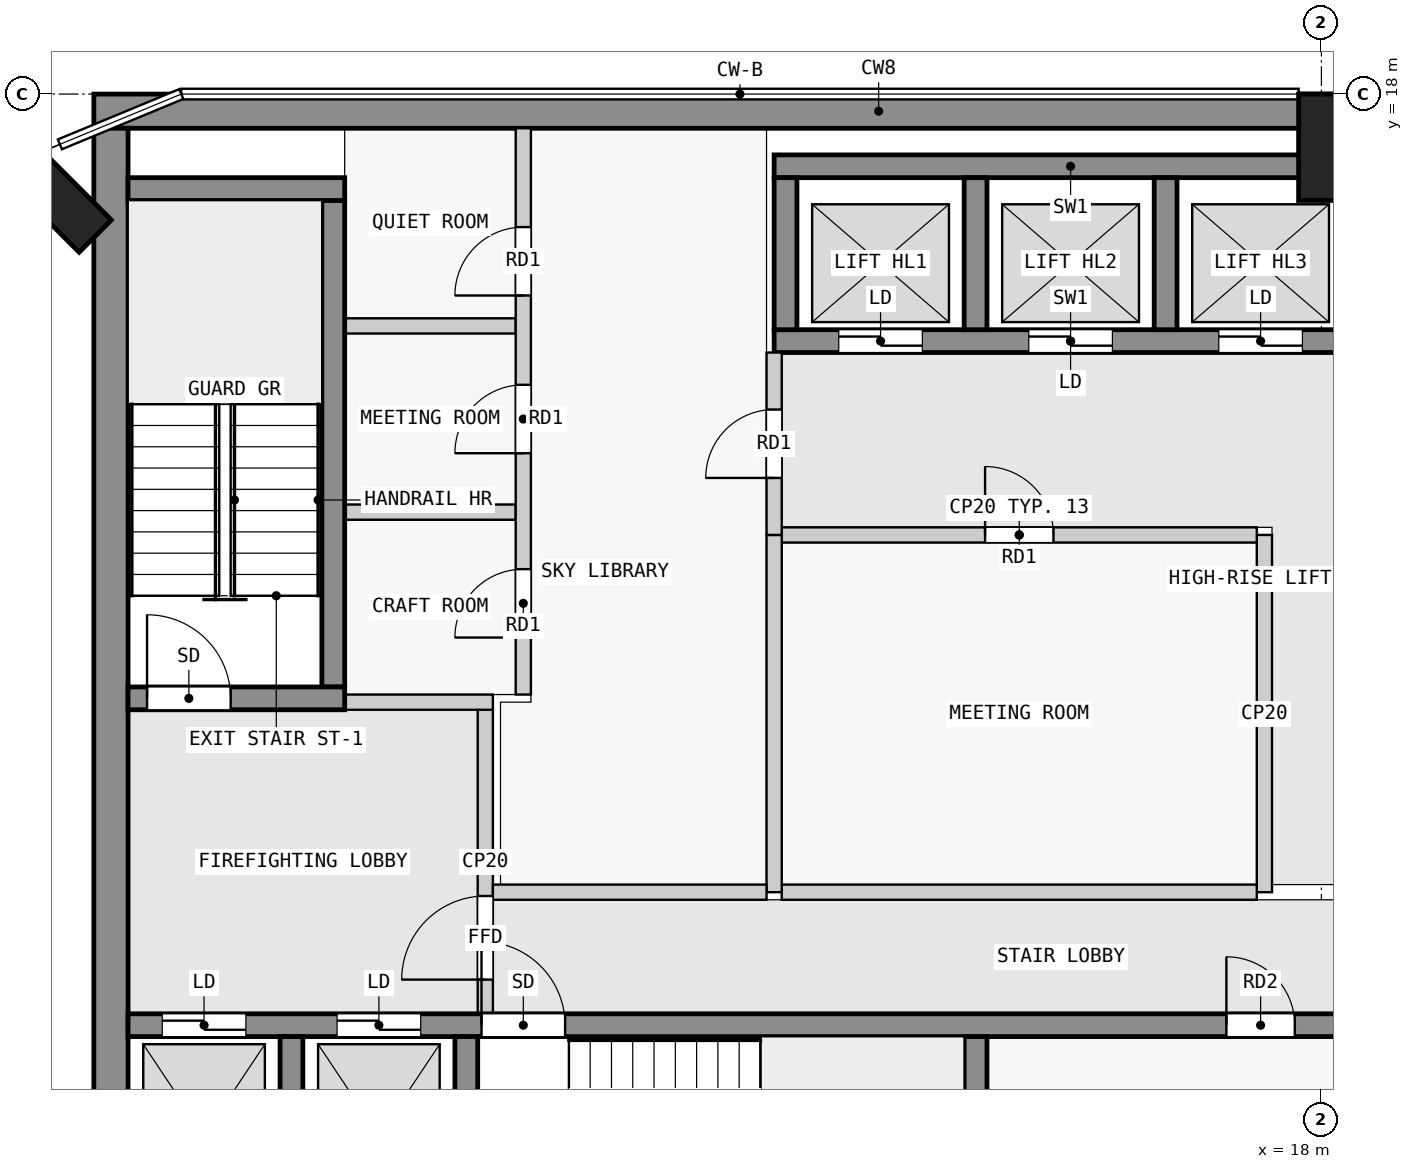
"""IFC4 building model, lengths in metres.
Left out: names, types, materials, properties, quantities, classifications, styles, units other than length and angle.
Written with IfcOpenShell. Run it as: python <this file> out.ifc"""

import sys

from ifc_helpers import new_model, si_unit, direction, frame, frame_2d, origin, origin_2d, place, context, subcontext, project, spatial, rectangle, extrude, element, fill, save


model = new_model("IFC4")
c1 = context("Model", 3, precision=1e-05, world=origin(), true_north=direction((0.0, 1.0)))
c2 = subcontext(c1, "Body", "Model", "MODEL_VIEW")
j1 = project(units=[si_unit("LENGTHUNIT", "METRE"), si_unit("PLANEANGLEUNIT", "RADIAN")], contexts=[c1])
p1 = place(None, origin())
s1 = spatial("IfcSite", under=j1, at=p1, CompositionType="ELEMENT")
p2 = place(p1, origin())
s2 = spatial("IfcBuilding", under=s1, at=p2, CompositionType="ELEMENT")
p3 = place(p2, frame((0.0, 0.0, 280.9)))
s3 = spatial("IfcBuildingStorey", under=s2, at=p3, CompositionType="ELEMENT", Elevation=280.9)
for number, where, z_axis, x_axis in (
    (1, (18.0, 17.3, 0.0), (0.0, 0.0, 1.0), (1.0, 0.0, 0.0)),
    (2, (1.374, 16.626, 0.0), (0.0, 0.0, 1.0), (0.707, 0.707, 0.0)),
):
    element("IfcColumn", number, at=place(p3, frame(where, z_axis=z_axis, x_axis=x_axis)), inside=s3, PredefinedType="COLUMN", context=c2, shape_type="SweptSolid", body=[
        extrude(rectangle(XDim=0.6, YDim=1.4, at=origin_2d()), origin(), (0.0, 0.0, 1.0), 3.5),
    ])
p4 = place(p3, frame((1.85, 17.775, 0.0), z_axis=(0.0, 0.0, 1.0), x_axis=(1.0, 0.0, 0.0)))
e3 = element("IfcWall", 3, at=p4, inside=s3, PredefinedType="SHEAR", context=c2, shape_type="SweptSolid", body=[
    extrude(rectangle(XDim=20.65, YDim=0.45, at=frame_2d((10.325, 0.0))), origin(), (0.0, 0.0, 1.0), 3.25),
])
p5 = place(p3, frame((2.075, 2.5, 0.0), z_axis=(0.0, 0.0, 1.0), x_axis=(0.0, 1.0, 0.0)))
e4 = element("IfcWall", 4, at=p5, inside=s3, PredefinedType="SHEAR", context=c2, shape_type="SweptSolid", body=[
    extrude(rectangle(XDim=15.05, YDim=0.45, at=frame_2d((7.525, 0.0))), origin(), (0.0, 0.0, 1.0), 3.25),
])
for number, where, z_axis, x_axis in (
    (5, (4.45, 2.8, 0.0), (0.0, 0.0, 1.0), (0.0, 1.0, 0.0)),
    (6, (6.75, 2.8, 0.0), (0.0, 0.0, 1.0), (0.0, 1.0, 0.0)),
    (7, (13.45, 2.8, 0.0), (0.0, 0.0, 1.0), (0.0, 1.0, 0.0)),
):
    element("IfcWall", number, at=place(p3, frame(where, z_axis=z_axis, x_axis=x_axis)), inside=s3, PredefinedType="SHEAR", context=c2, shape_type="SweptSolid", body=[
        extrude(rectangle(XDim=2.8, YDim=0.3, at=frame_2d((1.4, 0.0))), origin(), (0.0, 0.0, 1.0), 3.25),
    ])
p6 = place(p3, frame((2.3, 5.75, 0.0), z_axis=(0.0, 0.0, 1.0), x_axis=(1.0, 0.0, 0.0)))
e8 = element("IfcWall", 8, at=p6, inside=s3, PredefinedType="SHEAR", context=c2, shape_type="SweptSolid", body=[
    extrude(rectangle(XDim=18.8, YDim=0.3, at=frame_2d((9.4, 0.0))), origin(), (0.0, 0.0, 1.0), 3.25),
])
p7 = place(p6, frame((4.65, 0.0, 0.0)))
e9 = element("IfcOpeningElement", 9, at=p7, cuts=e8, PredefinedType="OPENING", context=c2, shape_type="SweptSolid", body=[
    extrude(rectangle(XDim=1.1, YDim=2.1, at=frame_2d((0.55, 1.05))), frame((0.0, 0.16, 0.0), z_axis=(0.0, -1.0, 0.0), x_axis=(1.0, 0.0, 0.0)), (0.0, 0.0, 1.0), 0.32),
])
p8 = place(p6, frame((0.45, 0.0, 0.0)))
e10 = element("IfcOpeningElement", 10, at=p8, cuts=e8, PredefinedType="OPENING", context=c2, shape_type="SweptSolid", body=[
    extrude(rectangle(XDim=1.1, YDim=2.1, at=frame_2d((0.55, 1.05))), frame((0.0, 0.16, 0.0), z_axis=(0.0, -1.0, 0.0), x_axis=(1.0, 0.0, 0.0)), (0.0, 0.0, 1.0), 0.32),
])
p9 = place(p6, frame((2.75, 0.0, 0.0)))
e11 = element("IfcOpeningElement", 11, at=p9, cuts=e8, PredefinedType="OPENING", context=c2, shape_type="SweptSolid", body=[
    extrude(rectangle(XDim=1.1, YDim=2.1, at=frame_2d((0.55, 1.05))), frame((0.0, 0.16, 0.0), z_axis=(0.0, -1.0, 0.0), x_axis=(1.0, 0.0, 0.0)), (0.0, 0.0, 1.0), 0.32),
])
p10 = place(p6, frame((14.45, 0.0, 0.0)))
e12 = element("IfcOpeningElement", 12, at=p10, cuts=e8, PredefinedType="OPENING", context=c2, shape_type="SweptSolid", body=[
    extrude(rectangle(XDim=0.9, YDim=2.1, at=frame_2d((0.45, 1.05))), frame((0.0, 0.16, 0.0), z_axis=(0.0, -1.0, 0.0), x_axis=(1.0, 0.0, 0.0)), (0.0, 0.0, 1.0), 0.32),
])
p11 = place(p3, frame((2.3, 10.05, 0.0), z_axis=(0.0, 0.0, 1.0), x_axis=(1.0, 0.0, 0.0)))
e13 = element("IfcWall", 13, at=p11, inside=s3, PredefinedType="SHEAR", context=c2, shape_type="SweptSolid", body=[
    extrude(rectangle(XDim=2.85, YDim=0.3, at=frame_2d((1.425, 0.0))), origin(), (0.0, 0.0, 1.0), 3.25),
])
p12 = place(p11, frame((0.25, 0.0, 0.0)))
e14 = element("IfcOpeningElement", 14, at=p12, cuts=e13, PredefinedType="OPENING", context=c2, shape_type="SweptSolid", body=[
    extrude(rectangle(XDim=1.1, YDim=2.1, at=frame_2d((0.55, 1.05))), frame((0.0, 0.16, 0.0), z_axis=(0.0, -1.0, 0.0), x_axis=(1.0, 0.0, 0.0)), (0.0, 0.0, 1.0), 0.32),
])
p13 = place(p3, frame((5.0, 10.2, 0.0), z_axis=(0.0, 0.0, 1.0), x_axis=(0.0, 1.0, 0.0)))
e15 = element("IfcWall", 15, at=p13, inside=s3, PredefinedType="SHEAR", context=c2, shape_type="SweptSolid", body=[
    extrude(rectangle(XDim=6.4, YDim=0.3, at=frame_2d((3.2, 0.0))), origin(), (0.0, 0.0, 1.0), 3.25),
])
p14 = place(p3, frame((2.3, 16.75, 0.0), z_axis=(0.0, 0.0, 1.0), x_axis=(1.0, 0.0, 0.0)))
e16 = element("IfcWall", 16, at=p14, inside=s3, PredefinedType="SHEAR", context=c2, shape_type="SweptSolid", body=[
    extrude(rectangle(XDim=2.85, YDim=0.3, at=frame_2d((1.425, 0.0))), origin(), (0.0, 0.0, 1.0), 3.25),
])
p15 = place(p3, frame((10.8, 17.05, 0.0), z_axis=(0.0, 0.0, 1.0), x_axis=(1.0, 0.0, 0.0)))
e17 = element("IfcWall", 17, at=p15, inside=s3, PredefinedType="SHEAR", context=c2, shape_type="SweptSolid", body=[
    extrude(rectangle(XDim=7.8, YDim=0.3, at=frame_2d((3.9, 0.0))), origin(), (0.0, 0.0, 1.0), 3.25),
])
p16 = place(p3, frame((10.8, 14.75, 0.0), z_axis=(0.0, 0.0, 1.0), x_axis=(1.0, 0.0, 0.0)))
e18 = element("IfcWall", 18, at=p16, inside=s3, PredefinedType="SHEAR", context=c2, shape_type="SweptSolid", body=[
    extrude(rectangle(XDim=7.8, YDim=0.3, at=frame_2d((3.9, 0.0))), origin(), (0.0, 0.0, 1.0), 3.25),
])
p17 = place(p16, frame((0.85, 0.0, 0.0)))
e19 = element("IfcOpeningElement", 19, at=p17, cuts=e18, PredefinedType="OPENING", context=c2, shape_type="SweptSolid", body=[
    extrude(rectangle(XDim=1.1, YDim=2.1, at=frame_2d((0.55, 1.05))), frame((0.0, 0.16, 0.0), z_axis=(0.0, -1.0, 0.0), x_axis=(1.0, 0.0, 0.0)), (0.0, 0.0, 1.0), 0.32),
])
p18 = place(p16, frame((3.35, 0.0, 0.0)))
e20 = element("IfcOpeningElement", 20, at=p18, cuts=e18, PredefinedType="OPENING", context=c2, shape_type="SweptSolid", body=[
    extrude(rectangle(XDim=1.1, YDim=2.1, at=frame_2d((0.55, 1.05))), frame((0.0, 0.16, 0.0), z_axis=(0.0, -1.0, 0.0), x_axis=(1.0, 0.0, 0.0)), (0.0, 0.0, 1.0), 0.32),
])
p19 = place(p16, frame((5.85, 0.0, 0.0)))
e21 = element("IfcOpeningElement", 21, at=p19, cuts=e18, PredefinedType="OPENING", context=c2, shape_type="SweptSolid", body=[
    extrude(rectangle(XDim=1.1, YDim=2.1, at=frame_2d((0.55, 1.05))), frame((0.0, 0.16, 0.0), z_axis=(0.0, -1.0, 0.0), x_axis=(1.0, 0.0, 0.0)), (0.0, 0.0, 1.0), 0.32),
])
for number, where, z_axis, x_axis in (
    (22, (10.95, 14.9, 0.0), (0.0, 0.0, 1.0), (0.0, 1.0, 0.0)),
    (23, (13.45, 14.9, 0.0), (0.0, 0.0, 1.0), (0.0, 1.0, 0.0)),
    (24, (15.95, 14.9, 0.0), (0.0, 0.0, 1.0), (0.0, 1.0, 0.0)),
):
    element("IfcWall", number, at=place(p3, frame(where, z_axis=z_axis, x_axis=x_axis)), inside=s3, PredefinedType="SHEAR", context=c2, shape_type="SweptSolid", body=[
        extrude(rectangle(XDim=2.0, YDim=0.3, at=frame_2d((1.0, 0.0))), origin(), (0.0, 0.0, 1.0), 3.25),
    ])
p20 = place(p3, frame((7.0, 5.9, 0.0), z_axis=(0.0, 0.0, 1.0), x_axis=(0.0, 1.0, 0.0)))
e25 = element("IfcWall", 25, at=p20, inside=s3, PredefinedType="PARTITIONING", context=c2, shape_type="SweptSolid", body=[
    extrude(rectangle(XDim=4.0, YDim=0.2, at=frame_2d((2.0, 0.0))), origin(), (0.0, 0.0, 1.0), 3.25),
])
p21 = place(p20, frame((0.45, 0.0, 0.0)))
e26 = element("IfcOpeningElement", 26, at=p21, cuts=e25, PredefinedType="OPENING", context=c2, shape_type="SweptSolid", body=[
    extrude(rectangle(XDim=1.1, YDim=2.1, at=frame_2d((0.55, 1.05))), frame((0.0, 0.11, 0.0), z_axis=(0.0, -1.0, 0.0), x_axis=(1.0, 0.0, 0.0)), (0.0, 0.0, 1.0), 0.22),
])
p22 = place(p3, frame((5.15, 10.0, 0.0), z_axis=(0.0, 0.0, 1.0), x_axis=(1.0, 0.0, 0.0)))
e27 = element("IfcWall", 27, at=p22, inside=s3, PredefinedType="PARTITIONING", context=c2, shape_type="SweptSolid", body=[
    extrude(rectangle(XDim=1.95, YDim=0.2, at=frame_2d((0.975, 0.0))), origin(), (0.0, 0.0, 1.0), 3.25),
])
p23 = place(p3, frame((7.1, 7.5, 0.0), z_axis=(0.0, 0.0, 1.0), x_axis=(1.0, 0.0, 0.0)))
e28 = element("IfcWall", 28, at=p23, inside=s3, PredefinedType="PARTITIONING", context=c2, shape_type="SweptSolid", body=[
    extrude(rectangle(XDim=3.6, YDim=0.2, at=frame_2d((1.8, 0.0))), origin(), (0.0, 0.0, 1.0), 3.25),
])
p24 = place(p3, frame((10.8, 12.2, 0.0), z_axis=(0.0, 0.0, 1.0), x_axis=(0.0, 1.0, 0.0)))
e29 = element("IfcWall", 29, at=p24, inside=s3, PredefinedType="PARTITIONING", context=c2, shape_type="SweptSolid", body=[
    extrude(rectangle(XDim=2.4, YDim=0.2, at=frame_2d((1.2, 0.0))), origin(), (0.0, 0.0, 1.0), 3.25),
])
p25 = place(p24, frame((0.75, 0.0, 0.0)))
e30 = element("IfcOpeningElement", 30, at=p25, cuts=e29, PredefinedType="OPENING", context=c2, shape_type="SweptSolid", body=[
    extrude(rectangle(XDim=0.9, YDim=2.1, at=frame_2d((0.45, 1.05))), frame((0.0, 0.11, 0.0), z_axis=(0.0, -1.0, 0.0), x_axis=(1.0, 0.0, 0.0)), (0.0, 0.0, 1.0), 0.22),
])
p26 = place(p3, frame((10.8, 7.5, 0.0), z_axis=(0.0, 0.0, 1.0), x_axis=(0.0, 1.0, 0.0)))
e31 = element("IfcWall", 31, at=p26, inside=s3, PredefinedType="PARTITIONING", context=c2, shape_type="SweptSolid", body=[
    extrude(rectangle(XDim=4.7, YDim=0.2, at=frame_2d((2.35, 0.0))), origin(), (0.0, 0.0, 1.0), 3.25),
])
p27 = place(p3, frame((10.9, 7.5, 0.0), z_axis=(0.0, 0.0, 1.0), x_axis=(1.0, 0.0, 0.0)))
e32 = element("IfcWall", 32, at=p27, inside=s3, PredefinedType="PARTITIONING", context=c2, shape_type="SweptSolid", body=[
    extrude(rectangle(XDim=6.25, YDim=0.2, at=frame_2d((3.125, 0.0))), origin(), (0.0, 0.0, 1.0), 3.25),
])
p28 = place(p3, frame((17.25, 7.5, 0.0), z_axis=(0.0, 0.0, 1.0), x_axis=(0.0, 1.0, 0.0)))
e33 = element("IfcWall", 33, at=p28, inside=s3, PredefinedType="PARTITIONING", context=c2, shape_type="SweptSolid", body=[
    extrude(rectangle(XDim=4.7, YDim=0.2, at=frame_2d((2.35, 0.0))), origin(), (0.0, 0.0, 1.0), 3.25),
])
p29 = place(p3, frame((10.9, 12.2, 0.0), z_axis=(0.0, 0.0, 1.0), x_axis=(1.0, 0.0, 0.0)))
e34 = element("IfcWall", 34, at=p29, inside=s3, PredefinedType="PARTITIONING", context=c2, shape_type="SweptSolid", body=[
    extrude(rectangle(XDim=6.25, YDim=0.2, at=frame_2d((3.125, 0.0))), origin(), (0.0, 0.0, 1.0), 3.25),
])
p30 = place(p29, frame((2.675, 0.0, 0.0)))
e35 = element("IfcOpeningElement", 35, at=p30, cuts=e34, PredefinedType="OPENING", context=c2, shape_type="SweptSolid", body=[
    extrude(rectangle(XDim=0.9, YDim=2.1, at=frame_2d((0.45, 1.05))), frame((0.0, 0.11, 0.0), z_axis=(0.0, -1.0, 0.0), x_axis=(1.0, 0.0, 0.0)), (0.0, 0.0, 1.0), 0.22),
])
p31 = place(p3, frame((7.5, 10.1, 0.0), z_axis=(0.0, 0.0, 1.0), x_axis=(0.0, 1.0, 0.0)))
e36 = element("IfcWall", 36, at=p31, inside=s3, PredefinedType="PARTITIONING", context=c2, shape_type="SweptSolid", body=[
    extrude(rectangle(XDim=7.45, YDim=0.2, at=frame_2d((3.725, 0.0))), origin(), (0.0, 0.0, 1.0), 3.25),
])
p32 = place(p31, frame((0.75, 0.0, 0.0)))
e37 = element("IfcOpeningElement", 37, at=p32, cuts=e36, PredefinedType="OPENING", context=c2, shape_type="SweptSolid", body=[
    extrude(rectangle(XDim=0.9, YDim=2.1, at=frame_2d((0.45, 1.05))), frame((0.0, 0.11, 0.0), z_axis=(0.0, -1.0, 0.0), x_axis=(1.0, 0.0, 0.0)), (0.0, 0.0, 1.0), 0.22),
])
p33 = place(p31, frame((3.175, 0.0, 0.0)))
e38 = element("IfcOpeningElement", 38, at=p33, cuts=e36, PredefinedType="OPENING", context=c2, shape_type="SweptSolid", body=[
    extrude(rectangle(XDim=0.9, YDim=2.1, at=frame_2d((0.45, 1.05))), frame((0.0, 0.11, 0.0), z_axis=(0.0, -1.0, 0.0), x_axis=(1.0, 0.0, 0.0)), (0.0, 0.0, 1.0), 0.22),
])
p34 = place(p31, frame((5.25, 0.0, 0.0)))
e39 = element("IfcOpeningElement", 39, at=p34, cuts=e36, PredefinedType="OPENING", context=c2, shape_type="SweptSolid", body=[
    extrude(rectangle(XDim=0.9, YDim=2.1, at=frame_2d((0.45, 1.05))), frame((0.0, 0.11, 0.0), z_axis=(0.0, -1.0, 0.0), x_axis=(1.0, 0.0, 0.0)), (0.0, 0.0, 1.0), 0.22),
])
for number, where, z_axis, x_axis in (
    (40, (5.15, 12.5, 0.0), (0.0, 0.0, 1.0), (1.0, 0.0, 0.0)),
    (41, (5.15, 14.95, 0.0), (0.0, 0.0, 1.0), (1.0, 0.0, 0.0)),
):
    element("IfcWall", number, at=place(p3, frame(where, z_axis=z_axis, x_axis=x_axis)), inside=s3, PredefinedType="PARTITIONING", context=c2, shape_type="SweptSolid", body=[
        extrude(rectangle(XDim=2.25, YDim=0.2, at=frame_2d((1.125, 0.0))), origin(), (0.0, 0.0, 1.0), 3.25),
    ])
p35 = place(p21, origin())
e42 = element("IfcDoor", 42, at=p35, inside=s3, OperationType="SINGLE_SWING_LEFT", PredefinedType="DOOR", context=c2, shape_type="SweptSolid", body=[
    extrude(rectangle(XDim=1.1, YDim=2.1, at=frame_2d((0.55, 1.05))), frame((0.0, 0.025, 0.0), z_axis=(0.0, -1.0, 0.0), x_axis=(1.0, 0.0, 0.0)), (0.0, 0.0, 1.0), 0.05),
])
fill(e26, e42)
p36 = place(p12, origin())
e43 = element("IfcDoor", 43, at=p36, inside=s3, OperationType="SINGLE_SWING_RIGHT", PredefinedType="DOOR", context=c2, shape_type="SweptSolid", body=[
    extrude(rectangle(XDim=1.1, YDim=2.1, at=frame_2d((0.55, 1.05))), frame((0.0, 0.025, 0.0), z_axis=(0.0, -1.0, 0.0), x_axis=(1.0, 0.0, 0.0)), (0.0, 0.0, 1.0), 0.05),
])
fill(e14, e43)
p37 = place(p25, origin())
e44 = element("IfcDoor", 44, at=p37, inside=s3, OperationType="SINGLE_SWING_LEFT", PredefinedType="DOOR", context=c2, shape_type="SweptSolid", body=[
    extrude(rectangle(XDim=0.9, YDim=2.1, at=frame_2d((0.45, 1.05))), frame((0.0, 0.025, 0.0), z_axis=(0.0, -1.0, 0.0), x_axis=(1.0, 0.0, 0.0)), (0.0, 0.0, 1.0), 0.05),
])
fill(e30, e44)
p38 = place(p30, origin())
e45 = element("IfcDoor", 45, at=p38, inside=s3, OperationType="SINGLE_SWING_LEFT", PredefinedType="DOOR", context=c2, shape_type="SweptSolid", body=[
    extrude(rectangle(XDim=0.9, YDim=2.1, at=frame_2d((0.45, 1.05))), frame((0.0, 0.025, 0.0), z_axis=(0.0, -1.0, 0.0), x_axis=(1.0, 0.0, 0.0)), (0.0, 0.0, 1.0), 0.05),
])
fill(e35, e45)
p39 = place(p7, origin())
e46 = element("IfcDoor", 46, at=p39, inside=s3, OperationType="SINGLE_SWING_LEFT", PredefinedType="DOOR", context=c2, shape_type="SweptSolid", body=[
    extrude(rectangle(XDim=1.1, YDim=2.1, at=frame_2d((0.55, 1.05))), frame((0.0, 0.025, 0.0), z_axis=(0.0, -1.0, 0.0), x_axis=(1.0, 0.0, 0.0)), (0.0, 0.0, 1.0), 0.05),
])
fill(e9, e46)
p40 = place(p8, origin())
e47 = element("IfcDoor", 47, at=p40, inside=s3, OperationType="DOUBLE_DOOR_SLIDING", PredefinedType="DOOR", context=c2, shape_type="SweptSolid", body=[
    extrude(rectangle(XDim=1.1, YDim=2.1, at=frame_2d((0.55, 1.05))), frame((0.0, 0.025, 0.0), z_axis=(0.0, -1.0, 0.0), x_axis=(1.0, 0.0, 0.0)), (0.0, 0.0, 1.0), 0.05),
])
fill(e10, e47)
p41 = place(p9, origin())
e48 = element("IfcDoor", 48, at=p41, inside=s3, OperationType="DOUBLE_DOOR_SLIDING", PredefinedType="DOOR", context=c2, shape_type="SweptSolid", body=[
    extrude(rectangle(XDim=1.1, YDim=2.1, at=frame_2d((0.55, 1.05))), frame((0.0, 0.025, 0.0), z_axis=(0.0, -1.0, 0.0), x_axis=(1.0, 0.0, 0.0)), (0.0, 0.0, 1.0), 0.05),
])
fill(e11, e48)
p42 = place(p17, origin())
e49 = element("IfcDoor", 49, at=p42, inside=s3, OperationType="DOUBLE_DOOR_SLIDING", PredefinedType="DOOR", context=c2, shape_type="SweptSolid", body=[
    extrude(rectangle(XDim=1.1, YDim=2.1, at=frame_2d((0.55, 1.05))), frame((0.0, 0.025, 0.0), z_axis=(0.0, -1.0, 0.0), x_axis=(1.0, 0.0, 0.0)), (0.0, 0.0, 1.0), 0.05),
])
fill(e19, e49)
p43 = place(p18, origin())
e50 = element("IfcDoor", 50, at=p43, inside=s3, OperationType="DOUBLE_DOOR_SLIDING", PredefinedType="DOOR", context=c2, shape_type="SweptSolid", body=[
    extrude(rectangle(XDim=1.1, YDim=2.1, at=frame_2d((0.55, 1.05))), frame((0.0, 0.025, 0.0), z_axis=(0.0, -1.0, 0.0), x_axis=(1.0, 0.0, 0.0)), (0.0, 0.0, 1.0), 0.05),
])
fill(e20, e50)
p44 = place(p19, origin())
e51 = element("IfcDoor", 51, at=p44, inside=s3, OperationType="DOUBLE_DOOR_SLIDING", PredefinedType="DOOR", context=c2, shape_type="SweptSolid", body=[
    extrude(rectangle(XDim=1.1, YDim=2.1, at=frame_2d((0.55, 1.05))), frame((0.0, 0.025, 0.0), z_axis=(0.0, -1.0, 0.0), x_axis=(1.0, 0.0, 0.0)), (0.0, 0.0, 1.0), 0.05),
])
fill(e21, e51)
p45 = place(p32, origin())
e52 = element("IfcDoor", 52, at=p45, inside=s3, OperationType="SINGLE_SWING_RIGHT", PredefinedType="DOOR", context=c2, shape_type="SweptSolid", body=[
    extrude(rectangle(XDim=0.9, YDim=2.1, at=frame_2d((0.45, 1.05))), frame((0.0, 0.025, 0.0), z_axis=(0.0, -1.0, 0.0), x_axis=(1.0, 0.0, 0.0)), (0.0, 0.0, 1.0), 0.05),
])
fill(e37, e52)
p46 = place(p33, origin())
e53 = element("IfcDoor", 53, at=p46, inside=s3, OperationType="SINGLE_SWING_RIGHT", PredefinedType="DOOR", context=c2, shape_type="SweptSolid", body=[
    extrude(rectangle(XDim=0.9, YDim=2.1, at=frame_2d((0.45, 1.05))), frame((0.0, 0.025, 0.0), z_axis=(0.0, -1.0, 0.0), x_axis=(1.0, 0.0, 0.0)), (0.0, 0.0, 1.0), 0.05),
])
fill(e38, e53)
p47 = place(p34, origin())
e54 = element("IfcDoor", 54, at=p47, inside=s3, OperationType="SINGLE_SWING_RIGHT", PredefinedType="DOOR", context=c2, shape_type="SweptSolid", body=[
    extrude(rectangle(XDim=0.9, YDim=2.1, at=frame_2d((0.45, 1.05))), frame((0.0, 0.025, 0.0), z_axis=(0.0, -1.0, 0.0), x_axis=(1.0, 0.0, 0.0)), (0.0, 0.0, 1.0), 0.05),
])
fill(e39, e54)
p48 = place(p10, origin())
e55 = element("IfcDoor", 55, at=p48, inside=s3, OperationType="SINGLE_SWING_LEFT", PredefinedType="DOOR", context=c2, shape_type="SweptSolid", body=[
    extrude(rectangle(XDim=0.9, YDim=2.1, at=frame_2d((0.45, 1.05))), frame((0.0, 0.025, 0.0), z_axis=(0.0, -1.0, 0.0), x_axis=(1.0, 0.0, 0.0)), (0.0, 0.0, 1.0), 0.05),
])
fill(e12, e55)
save(model, sys.argv[1])
